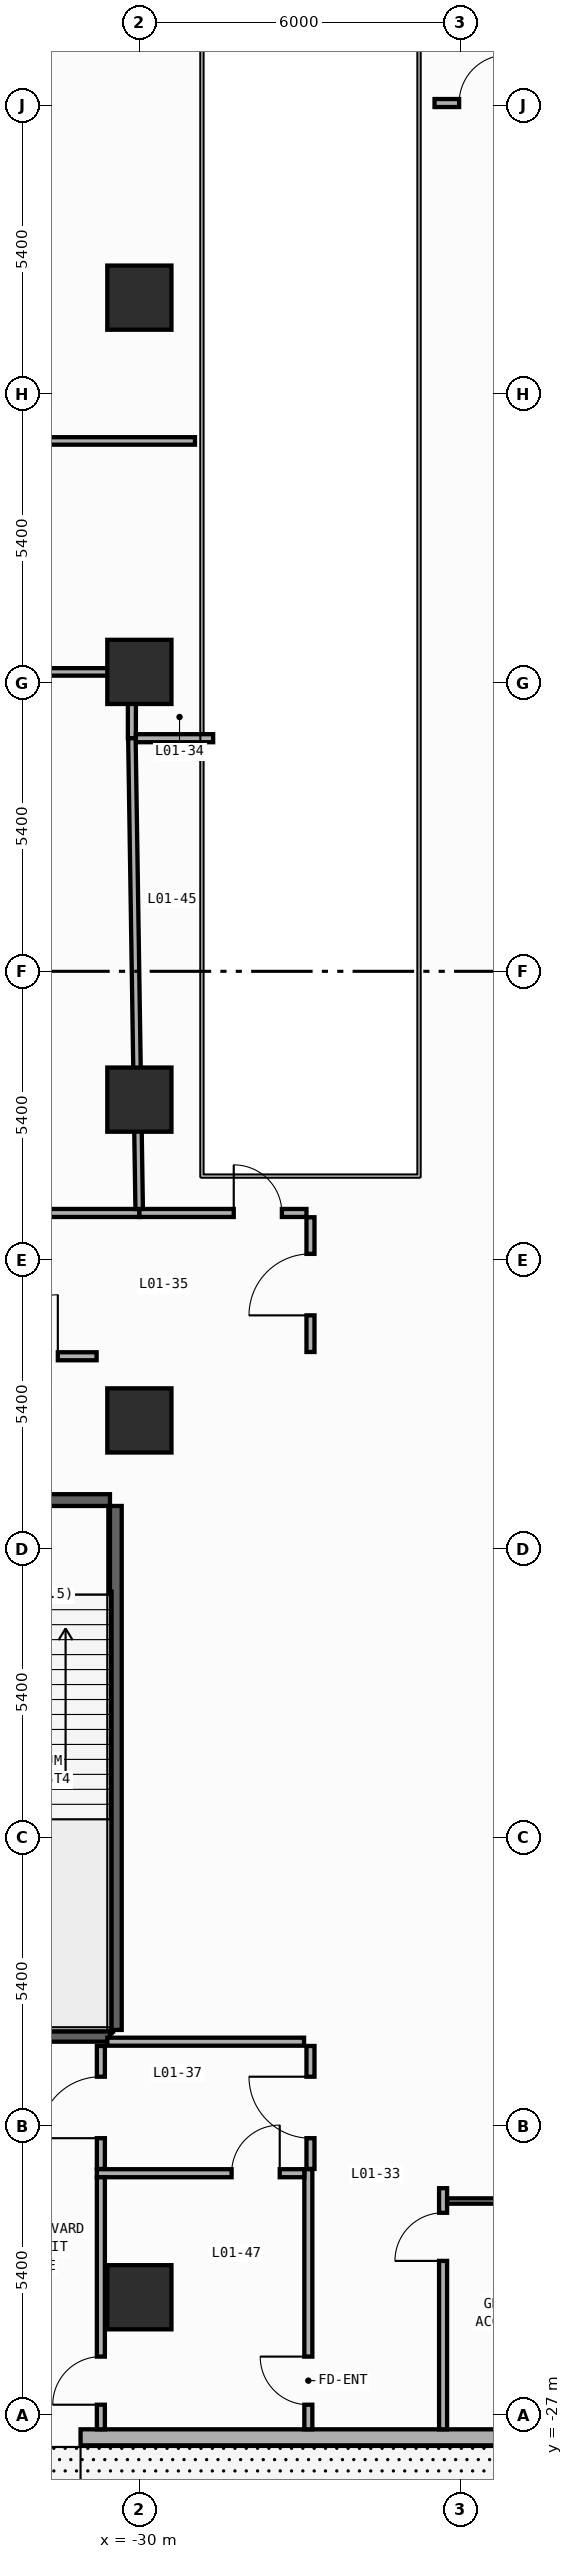
"""IFC4 building model, lengths in metres.
Left out: names, types, materials, properties, quantities, classifications, styles, units other than length and angle.
Written with IfcOpenShell. Run it as: python <this file> out.ifc"""

import sys

from ifc_helpers import new_model, si_unit, direction, frame, frame_2d, origin, origin_2d, place, context, subcontext, project, spatial, rectangle, extrude, element, fill, save


model = new_model("IFC4")
c1 = context("Model", 3, precision=1e-05, world=origin(), true_north=direction((0.0, 1.0)))
c2 = subcontext(c1, "Body", "Model", "MODEL_VIEW")
j1 = project(units=[si_unit("LENGTHUNIT", "METRE"), si_unit("PLANEANGLEUNIT", "RADIAN")], contexts=[c1])
p1 = place(None, origin())
s1 = spatial("IfcSite", under=j1, at=p1, CompositionType="ELEMENT")
p2 = place(p1, origin())
s2 = spatial("IfcBuilding", under=s1, at=p2, CompositionType="ELEMENT")
p3 = place(p2, origin())
s3 = spatial("IfcBuildingStorey", under=s2, at=p3, CompositionType="ELEMENT", Elevation=0.0)
p4 = place(p3, frame((-34.02, -9.89, 0.0), z_axis=(0.0, 0.0, 1.0), x_axis=(1.0, 0.0, 0.0)))
e1 = element("IfcWall", 1, at=p4, inside=s3, PredefinedType="SHEAR", context=c2, shape_type="SweptSolid", body=[
    extrude(rectangle(XDim=3.47, YDim=0.22, at=frame_2d((1.735, 0.0))), origin(), (0.0, 0.0, 1.0), 5.7),
])
p5 = place(p4, frame((1.18, 0.0, 0.0)))
e2 = element("IfcOpeningElement", 2, at=p5, cuts=e1, PredefinedType="OPENING", context=c2, shape_type="SweptSolid", body=[
    extrude(rectangle(XDim=1.1, YDim=2.2, at=frame_2d((0.55, 1.1))), frame((0.0, 0.12, 0.0), z_axis=(0.0, -1.0, 0.0), x_axis=(1.0, 0.0, 0.0)), (0.0, 0.0, 1.0), 0.24),
])
p6 = place(p3, frame((-34.02, -19.91, 0.0), z_axis=(0.0, 0.0, 1.0), x_axis=(1.0, 0.0, 0.0)))
e3 = element("IfcWall", 3, at=p6, inside=s3, PredefinedType="SHEAR", context=c2, shape_type="SweptSolid", body=[
    extrude(rectangle(XDim=3.47, YDim=0.22, at=frame_2d((1.735, 0.0))), origin(), (0.0, 0.0, 1.0), 5.7),
])
p7 = place(p3, frame((-30.44, -19.8, 0.0), z_axis=(0.0, 0.0, 1.0), x_axis=(0.0, 1.0, 0.0)))
e4 = element("IfcWall", 4, at=p7, inside=s3, PredefinedType="SHEAR", context=c2, shape_type="SweptSolid", body=[
    extrude(rectangle(XDim=9.8, YDim=0.22, at=frame_2d((4.9, 0.0))), origin(), (0.0, 0.0, 1.0), 5.7),
])
for number, where, z_axis, x_axis in (
    (5, (-30.0, -24.8, 0.0), (0.0, 0.0, 1.0), (1.0, 0.0, 0.0)),
    (6, (-30.0, -8.4, 0.0), (0.0, 0.0, 1.0), (1.0, 0.0, 0.0)),
    (7, (-30.0, -2.4, 0.0), (0.0, 0.0, 1.0), (1.0, 0.0, 0.0)),
    (8, (-30.0, 5.6, 0.0), (0.0, 0.0, 1.0), (1.0, 0.0, 0.0)),
    (9, (-30.0, 12.6, 0.0), (0.0, 0.0, 1.0), (1.0, 0.0, 0.0)),
):
    element("IfcColumn", number, at=place(p3, frame(where, z_axis=z_axis, x_axis=x_axis)), inside=s3, PredefinedType="COLUMN", context=c2, shape_type="SweptSolid", body=[
        extrude(rectangle(XDim=1.2, YDim=1.2, at=origin_2d()), origin(), (0.0, 0.0, 1.0), 6.0),
    ])
p8 = place(p3, frame((-8.2, -27.42, 0.0), z_axis=(0.0, 0.0, 1.0), x_axis=(-1.0, 0.0, 0.0)))
e10 = element("IfcWall", 10, at=p8, inside=s3, PredefinedType="STANDARD", context=c2, shape_type="SweptSolid", body=[
    extrude(rectangle(XDim=26.4, YDim=0.3, at=frame_2d((13.2, 0.0))), origin(), (0.0, 0.0, 1.0), 5.7),
])
p9 = place(p8, frame((22.9, 0.0, 0.0)))
e11 = element("IfcOpeningElement", 11, at=p9, cuts=e10, PredefinedType="OPENING", context=c2, shape_type="SweptSolid", body=[
    extrude(rectangle(XDim=2.0, YDim=2.4, at=frame_2d((1.0, 1.2))), frame((0.0, 0.16, 0.0), z_axis=(0.0, -1.0, 0.0), x_axis=(1.0, 0.0, 0.0)), (0.0, 0.0, 1.0), 0.32),
])
p10 = place(p8, frame((4.5, 0.0, 0.85)))
e12 = element("IfcOpeningElement", 12, at=p10, cuts=e10, PredefinedType="OPENING", context=c2, shape_type="SweptSolid", body=[
    extrude(rectangle(XDim=2.4, YDim=2.5, at=frame_2d((1.2, 1.25))), frame((0.0, 0.16, 0.0), z_axis=(0.0, -1.0, 0.0), x_axis=(1.0, 0.0, 0.0)), (0.0, 0.0, 1.0), 0.32),
])
p11 = place(p8, frame((11.5, 0.0, 0.85)))
e13 = element("IfcOpeningElement", 13, at=p11, cuts=e10, PredefinedType="OPENING", context=c2, shape_type="SweptSolid", body=[
    extrude(rectangle(XDim=2.1, YDim=2.0, at=frame_2d((1.05, 1.0))), frame((0.0, 0.16, 0.0), z_axis=(0.0, -1.0, 0.0), x_axis=(1.0, 0.0, 0.0)), (0.0, 0.0, 1.0), 0.32),
])
p12 = place(p3, frame((-33.4, -7.2, 0.0), z_axis=(0.0, 0.0, 1.0), x_axis=(1.0, 0.0, 0.0)))
e14 = element("IfcWall", 14, at=p12, inside=s3, PredefinedType="PARTITIONING", context=c2, shape_type="SweptSolid", body=[
    extrude(rectangle(XDim=2.6, YDim=0.15, at=frame_2d((1.3, 0.0))), origin(), (0.0, 0.0, 1.0), 5.7),
])
p13 = place(p12, frame((0.725, 0.0, 0.0)))
e15 = element("IfcOpeningElement", 15, at=p13, cuts=e14, PredefinedType="OPENING", context=c2, shape_type="SweptSolid", body=[
    extrude(rectangle(XDim=1.15, YDim=2.2, at=frame_2d((0.575, 1.1))), frame((0.0, 0.085, 0.0), z_axis=(0.0, -1.0, 0.0), x_axis=(1.0, 0.0, 0.0)), (0.0, 0.0, 1.0), 0.17),
])
p14 = place(p3, frame((-26.8, -7.12, 0.0), z_axis=(0.0, 0.0, 1.0), x_axis=(0.0, 1.0, 0.0)))
e16 = element("IfcWall", 16, at=p14, inside=s3, PredefinedType="PARTITIONING", context=c2, shape_type="SweptSolid", body=[
    extrude(rectangle(XDim=2.52, YDim=0.15, at=frame_2d((1.26, 0.0))), origin(), (0.0, 0.0, 1.0), 5.7),
])
p15 = place(p14, frame((0.685, 0.0, 0.0)))
e17 = element("IfcOpeningElement", 17, at=p15, cuts=e16, PredefinedType="OPENING", context=c2, shape_type="SweptSolid", body=[
    extrude(rectangle(XDim=1.15, YDim=2.2, at=frame_2d((0.575, 1.1))), frame((0.0, 0.085, 0.0), z_axis=(0.0, -1.0, 0.0), x_axis=(1.0, 0.0, 0.0)), (0.0, 0.0, 1.0), 0.17),
])
p16 = place(p3, frame((-26.8, -22.4, 0.0), z_axis=(0.0, 0.0, 1.0), x_axis=(0.0, 1.0, 0.0)))
e18 = element("IfcWall", 18, at=p16, inside=s3, PredefinedType="PARTITIONING", context=c2, shape_type="SweptSolid", body=[
    extrude(rectangle(XDim=2.3, YDim=0.15, at=frame_2d((1.15, 0.0))), origin(), (0.0, 0.0, 1.0), 5.7),
])
p17 = place(p16, frame((0.575, 0.0, 0.0)))
e19 = element("IfcOpeningElement", 19, at=p17, cuts=e18, PredefinedType="OPENING", context=c2, shape_type="SweptSolid", body=[
    extrude(rectangle(XDim=1.15, YDim=2.2, at=frame_2d((0.575, 1.1))), frame((0.0, 0.085, 0.0), z_axis=(0.0, -1.0, 0.0), x_axis=(1.0, 0.0, 0.0)), (0.0, 0.0, 1.0), 0.17),
])
p18 = place(p3, frame((-30.72, -22.4, 0.0), z_axis=(0.0, 0.0, 1.0), x_axis=(0.0, 1.0, 0.0)))
e20 = element("IfcWall", 20, at=p18, inside=s3, PredefinedType="PARTITIONING", context=c2, shape_type="SweptSolid", body=[
    extrude(rectangle(XDim=2.3, YDim=0.15, at=frame_2d((1.15, 0.0))), origin(), (0.0, 0.0, 1.0), 5.7),
])
p19 = place(p18, frame((0.575, 0.0, 0.0)))
e21 = element("IfcOpeningElement", 21, at=p19, cuts=e20, PredefinedType="OPENING", context=c2, shape_type="SweptSolid", body=[
    extrude(rectangle(XDim=1.15, YDim=2.2, at=frame_2d((0.575, 1.1))), frame((0.0, 0.085, 0.0), z_axis=(0.0, -1.0, 0.0), x_axis=(1.0, 0.0, 0.0)), (0.0, 0.0, 1.0), 0.17),
])
p20 = place(p3, frame((-30.6, -20.02, 0.0), z_axis=(0.0, 0.0, 1.0), x_axis=(1.0, 0.0, 0.0)))
e22 = element("IfcWall", 22, at=p20, inside=s3, PredefinedType="PARTITIONING", context=c2, shape_type="SweptSolid", body=[
    extrude(rectangle(XDim=3.68, YDim=0.15, at=frame_2d((1.84, 0.0))), origin(), (0.0, 0.0, 1.0), 5.7),
])
p21 = place(p3, frame((-26.84, -27.27, 0.0), z_axis=(0.0, 0.0, 1.0), x_axis=(0.0, 1.0, 0.0)))
e23 = element("IfcWall", 23, at=p21, inside=s3, PredefinedType="PARTITIONING", context=c2, shape_type="SweptSolid", body=[
    extrude(rectangle(XDim=4.865, YDim=0.15, at=frame_2d((2.433, 0.0))), origin(), (0.0, 0.0, 1.0), 5.7),
])
p22 = place(p21, frame((0.46, 0.0, 0.0)))
e24 = element("IfcOpeningElement", 24, at=p22, cuts=e23, PredefinedType="OPENING", context=c2, shape_type="SweptSolid", body=[
    extrude(rectangle(XDim=0.9, YDim=2.15, at=frame_2d((0.45, 1.075))), frame((0.0, 0.085, 0.0), z_axis=(0.0, -1.0, 0.0), x_axis=(1.0, 0.0, 0.0)), (0.0, 0.0, 1.0), 0.17),
])
p23 = place(p3, frame((-24.32, -27.27, 0.0), z_axis=(0.0, 0.0, 1.0), x_axis=(0.0, 1.0, 0.0)))
e25 = element("IfcWall", 25, at=p23, inside=s3, PredefinedType="PARTITIONING", context=c2, shape_type="SweptSolid", body=[
    extrude(rectangle(XDim=4.51, YDim=0.15, at=frame_2d((2.255, 0.0))), origin(), (0.0, 0.0, 1.0), 5.7),
])
p24 = place(p23, frame((3.15, 0.0, 0.0)))
e26 = element("IfcOpeningElement", 26, at=p24, cuts=e25, PredefinedType="OPENING", context=c2, shape_type="SweptSolid", body=[
    extrude(rectangle(XDim=0.9, YDim=2.15, at=frame_2d((0.45, 1.075))), frame((0.0, 0.085, 0.0), z_axis=(0.0, -1.0, 0.0), x_axis=(1.0, 0.0, 0.0)), (0.0, 0.0, 1.0), 0.17),
])
p25 = place(p3, frame((-30.14, 4.36, 0.0), z_axis=(0.0, 0.0, 1.0), x_axis=(0.0, 1.0, 0.0)))
e27 = element("IfcWall", 27, at=p25, inside=s3, PredefinedType="PARTITIONING", context=c2, shape_type="SweptSolid", body=[
    extrude(rectangle(XDim=1.31, YDim=0.15, at=frame_2d((0.655, 0.0))), origin(), (0.0, 0.0, 1.0), 4.8),
])
p26 = place(p3, frame((-30.065, 4.36, 0.0), z_axis=(0.0, 0.0, 1.0), x_axis=(1.0, 0.0, 0.0)))
e28 = element("IfcWall", 28, at=p26, inside=s3, PredefinedType="PARTITIONING", context=c2, shape_type="SweptSolid", body=[
    extrude(rectangle(XDim=1.445, YDim=0.15, at=frame_2d((0.722, 0.0))), origin(), (0.0, 0.0, 1.0), 5.7),
])
p27 = place(p3, frame((-33.64, -4.52, 0.0), z_axis=(0.0, 0.0, 1.0), x_axis=(1.0, 0.0, 0.0)))
e29 = element("IfcWall", 29, at=p27, inside=s3, PredefinedType="PARTITIONING", context=c2, shape_type="SweptSolid", body=[
    extrude(rectangle(XDim=3.64, YDim=0.15, at=frame_2d((1.82, 0.0))), origin(), (0.0, 0.0, 1.0), 5.7),
])
p28 = place(p27, frame((1.067, 0.0, 0.0)))
e30 = element("IfcOpeningElement", 30, at=p28, cuts=e29, PredefinedType="OPENING", context=c2, shape_type="SweptSolid", body=[
    extrude(rectangle(XDim=0.9, YDim=2.15, at=frame_2d((0.45, 1.075))), frame((0.0, 0.085, 0.0), z_axis=(0.0, -1.0, 0.0), x_axis=(1.0, 0.0, 0.0)), (0.0, 0.0, 1.0), 0.17),
])
p29 = place(p3, frame((-30.0, -4.52, 0.0), z_axis=(0.0, 0.0, 1.0), x_axis=(1.0, 0.0, 0.0)))
e31 = element("IfcWall", 31, at=p29, inside=s3, PredefinedType="PARTITIONING", context=c2, shape_type="SweptSolid", body=[
    extrude(rectangle(XDim=3.125, YDim=0.15, at=frame_2d((1.562, 0.0))), origin(), (0.0, 0.0, 1.0), 5.7),
])
p30 = place(p29, frame((1.765, 0.0, 0.0)))
e32 = element("IfcOpeningElement", 32, at=p30, cuts=e31, PredefinedType="OPENING", context=c2, shape_type="SweptSolid", body=[
    extrude(rectangle(XDim=0.9, YDim=2.15, at=frame_2d((0.45, 1.075))), frame((0.0, 0.085, 0.0), z_axis=(0.0, -1.0, 0.0), x_axis=(1.0, 0.0, 0.0)), (0.0, 0.0, 1.0), 0.17),
])
p31 = place(p3, frame((-30.795, -22.48, 0.0), z_axis=(0.0, 0.0, 1.0), x_axis=(1.0, 0.0, 0.0)))
e33 = element("IfcWall", 33, at=p31, inside=s3, PredefinedType="PARTITIONING", context=c2, shape_type="SweptSolid", body=[
    extrude(rectangle(XDim=3.88, YDim=0.15, at=frame_2d((1.94, 0.0))), origin(), (0.0, 0.0, 1.0), 5.7),
])
p32 = place(p31, frame((2.52, 0.0, 0.0)))
e34 = element("IfcOpeningElement", 34, at=p32, cuts=e33, PredefinedType="OPENING", context=c2, shape_type="SweptSolid", body=[
    extrude(rectangle(XDim=0.9, YDim=2.15, at=frame_2d((0.45, 1.075))), frame((0.0, 0.085, 0.0), z_axis=(0.0, -1.0, 0.0), x_axis=(1.0, 0.0, 0.0)), (0.0, 0.0, 1.0), 0.17),
])
p33 = place(p3, frame((-30.72, -27.27, 0.0), z_axis=(0.0, 0.0, 1.0), x_axis=(0.0, 1.0, 0.0)))
e35 = element("IfcWall", 35, at=p33, inside=s3, PredefinedType="PARTITIONING", context=c2, shape_type="SweptSolid", body=[
    extrude(rectangle(XDim=4.715, YDim=0.15, at=frame_2d((2.357, 0.0))), origin(), (0.0, 0.0, 1.0), 5.7),
])
p34 = place(p33, frame((0.46, 0.0, 0.0)))
e36 = element("IfcOpeningElement", 36, at=p34, cuts=e35, PredefinedType="OPENING", context=c2, shape_type="SweptSolid", body=[
    extrude(rectangle(XDim=0.9, YDim=2.15, at=frame_2d((0.45, 1.075))), frame((0.0, 0.085, 0.0), z_axis=(0.0, -1.0, 0.0), x_axis=(1.0, 0.0, 0.0)), (0.0, 0.0, 1.0), 0.17),
])
p35 = place(p3, frame((-24.48, 16.24, 0.0), z_axis=(0.0, 0.0, 1.0), x_axis=(1.0, 0.0, 0.0)))
e37 = element("IfcWall", 37, at=p35, inside=s3, PredefinedType="PARTITIONING", context=c2, shape_type="SweptSolid", body=[
    extrude(rectangle(XDim=10.08, YDim=0.15, at=frame_2d((5.04, 0.0))), origin(), (0.0, 0.0, 1.0), 5.7),
])
p36 = place(p35, frame((0.46, 0.0, 0.0)))
e38 = element("IfcOpeningElement", 38, at=p36, cuts=e37, PredefinedType="OPENING", context=c2, shape_type="SweptSolid", body=[
    extrude(rectangle(XDim=0.9, YDim=2.15, at=frame_2d((0.45, 1.075))), frame((0.0, 0.085, 0.0), z_axis=(0.0, -1.0, 0.0), x_axis=(1.0, 0.0, 0.0)), (0.0, 0.0, 1.0), 0.17),
])
p37 = place(p3, frame((-36.27, 9.92, 0.0), z_axis=(0.0, 0.0, 1.0), x_axis=(1.0, 0.0, 0.0)))
e39 = element("IfcWall", 39, at=p37, inside=s3, PredefinedType="PARTITIONING", context=c2, shape_type="SweptSolid", body=[
    extrude(rectangle(XDim=7.31, YDim=0.14, at=frame_2d((3.655, 0.0))), origin(), (0.0, 0.0, 1.0), 5.7),
])
p38 = place(p37, frame((3.743, 0.0, 0.0)))
e40 = element("IfcOpeningElement", 40, at=p38, cuts=e39, PredefinedType="OPENING", context=c2, shape_type="SweptSolid", body=[
    extrude(rectangle(XDim=0.85, YDim=2.1, at=frame_2d((0.425, 1.05))), frame((0.0, 0.08, 0.0), z_axis=(0.0, -1.0, 0.0), x_axis=(1.0, 0.0, 0.0)), (0.0, 0.0, 1.0), 0.16),
])
p39 = place(p3, frame((-30.004, -4.445, 0.0), z_axis=(0.0, 0.0, 1.0), x_axis=(-0.015469783933, 0.999880335733, 0.0)))
e41 = element("IfcWall", 41, at=p39, inside=s3, PredefinedType="PARTITIONING", context=c2, shape_type="SweptSolid", body=[
    extrude(rectangle(XDim=8.806, YDim=0.14, at=frame_2d((4.403, 0.0))), origin(), (0.0, 0.0, 1.0), 4.8),
])
p40 = place(p3, frame((-36.27, 5.6, 0.0), z_axis=(0.0, 0.0, 1.0), x_axis=(1.0, 0.0, 0.0)))
e42 = element("IfcWall", 42, at=p40, inside=s3, PredefinedType="PARTITIONING", context=c2, shape_type="SweptSolid", body=[
    extrude(rectangle(XDim=6.055, YDim=0.14, at=frame_2d((3.027, 0.0))), origin(), (0.0, 0.0, 1.0), 4.8),
])
p41 = place(p40, frame((3.725, 0.0, 0.0)))
e43 = element("IfcOpeningElement", 43, at=p41, cuts=e42, PredefinedType="OPENING", context=c2, shape_type="SweptSolid", body=[
    extrude(rectangle(XDim=0.85, YDim=2.1, at=frame_2d((0.425, 1.05))), frame((0.0, 0.08, 0.0), z_axis=(0.0, -1.0, 0.0), x_axis=(1.0, 0.0, 0.0)), (0.0, 0.0, 1.0), 0.16),
])
p42 = place(p3, frame((-24.245, -23.0, 0.0), z_axis=(0.0, 0.0, 1.0), x_axis=(1.0, 0.0, 0.0)))
e44 = element("IfcWall", 44, at=p42, inside=s3, PredefinedType="PARTITIONING", context=c2, shape_type="SweptSolid", body=[
    extrude(rectangle(XDim=3.045, YDim=0.1, at=frame_2d((1.522, 0.0))), origin(), (0.0, 0.0, 1.0), 5.7),
])
p43 = place(p9, origin())
e45 = element("IfcDoor", 45, at=p43, inside=s3, OperationType="DOUBLE_DOOR_SINGLE_SWING", PredefinedType="DOOR", context=c2, shape_type="SweptSolid", body=[
    extrude(rectangle(XDim=2.0, YDim=2.4, at=frame_2d((1.0, 1.2))), frame((0.0, 0.025, 0.0), z_axis=(0.0, -1.0, 0.0), x_axis=(1.0, 0.0, 0.0)), (0.0, 0.0, 1.0), 0.05),
])
fill(e11, e45)
p44 = place(p13, origin())
e46 = element("IfcDoor", 46, at=p44, inside=s3, OperationType="SINGLE_SWING_RIGHT", PredefinedType="DOOR", context=c2, shape_type="SweptSolid", body=[
    extrude(rectangle(XDim=1.15, YDim=2.2, at=frame_2d((0.575, 1.1))), frame((0.0, 0.025, 0.0), z_axis=(0.0, -1.0, 0.0), x_axis=(1.0, 0.0, 0.0)), (0.0, 0.0, 1.0), 0.05),
])
fill(e15, e46)
p45 = place(p15, origin())
e47 = element("IfcDoor", 47, at=p45, inside=s3, OperationType="SINGLE_SWING_LEFT", PredefinedType="DOOR", context=c2, shape_type="SweptSolid", body=[
    extrude(rectangle(XDim=1.15, YDim=2.2, at=frame_2d((0.575, 1.1))), frame((0.0, 0.025, 0.0), z_axis=(0.0, -1.0, 0.0), x_axis=(1.0, 0.0, 0.0)), (0.0, 0.0, 1.0), 0.05),
])
fill(e17, e47)
p46 = place(p17, origin())
e48 = element("IfcDoor", 48, at=p46, inside=s3, OperationType="SINGLE_SWING_RIGHT", PredefinedType="DOOR", context=c2, shape_type="SweptSolid", body=[
    extrude(rectangle(XDim=1.15, YDim=2.2, at=frame_2d((0.575, 1.1))), frame((0.0, 0.025, 0.0), z_axis=(0.0, -1.0, 0.0), x_axis=(1.0, 0.0, 0.0)), (0.0, 0.0, 1.0), 0.05),
])
fill(e19, e48)
p47 = place(p19, origin())
e49 = element("IfcDoor", 49, at=p47, inside=s3, OperationType="SINGLE_SWING_LEFT", PredefinedType="DOOR", context=c2, shape_type="SweptSolid", body=[
    extrude(rectangle(XDim=1.15, YDim=2.2, at=frame_2d((0.575, 1.1))), frame((0.0, 0.025, 0.0), z_axis=(0.0, -1.0, 0.0), x_axis=(1.0, 0.0, 0.0)), (0.0, 0.0, 1.0), 0.05),
])
fill(e21, e49)
p48 = place(p22, origin())
e50 = element("IfcDoor", 50, at=p48, inside=s3, OperationType="SINGLE_SWING_RIGHT", PredefinedType="DOOR", context=c2, shape_type="SweptSolid", body=[
    extrude(rectangle(XDim=0.9, YDim=2.15, at=frame_2d((0.45, 1.075))), frame((0.0, 0.025, 0.0), z_axis=(0.0, -1.0, 0.0), x_axis=(1.0, 0.0, 0.0)), (0.0, 0.0, 1.0), 0.05),
])
fill(e24, e50)
p49 = place(p24, origin())
e51 = element("IfcDoor", 51, at=p49, inside=s3, OperationType="SINGLE_SWING_LEFT", PredefinedType="DOOR", context=c2, shape_type="SweptSolid", body=[
    extrude(rectangle(XDim=0.9, YDim=2.15, at=frame_2d((0.45, 1.075))), frame((0.0, 0.025, 0.0), z_axis=(0.0, -1.0, 0.0), x_axis=(1.0, 0.0, 0.0)), (0.0, 0.0, 1.0), 0.05),
])
fill(e26, e51)
p50 = place(p30, origin())
e52 = element("IfcDoor", 52, at=p50, inside=s3, OperationType="SINGLE_SWING_LEFT", PredefinedType="DOOR", context=c2, shape_type="SweptSolid", body=[
    extrude(rectangle(XDim=0.9, YDim=2.15, at=frame_2d((0.45, 1.075))), frame((0.0, 0.025, 0.0), z_axis=(0.0, -1.0, 0.0), x_axis=(1.0, 0.0, 0.0)), (0.0, 0.0, 1.0), 0.05),
])
fill(e32, e52)
p51 = place(p32, origin())
e53 = element("IfcDoor", 53, at=p51, inside=s3, OperationType="SINGLE_SWING_RIGHT", PredefinedType="DOOR", context=c2, shape_type="SweptSolid", body=[
    extrude(rectangle(XDim=0.9, YDim=2.15, at=frame_2d((0.45, 1.075))), frame((0.0, 0.025, 0.0), z_axis=(0.0, -1.0, 0.0), x_axis=(1.0, 0.0, 0.0)), (0.0, 0.0, 1.0), 0.05),
])
fill(e34, e53)
p52 = place(p34, origin())
e54 = element("IfcDoor", 54, at=p52, inside=s3, OperationType="SINGLE_SWING_LEFT", PredefinedType="DOOR", context=c2, shape_type="SweptSolid", body=[
    extrude(rectangle(XDim=0.9, YDim=2.15, at=frame_2d((0.45, 1.075))), frame((0.0, 0.025, 0.0), z_axis=(0.0, -1.0, 0.0), x_axis=(1.0, 0.0, 0.0)), (0.0, 0.0, 1.0), 0.05),
])
fill(e36, e54)
p53 = place(p36, origin())
e55 = element("IfcDoor", 55, at=p53, inside=s3, OperationType="SINGLE_SWING_RIGHT", PredefinedType="DOOR", context=c2, shape_type="SweptSolid", body=[
    extrude(rectangle(XDim=0.9, YDim=2.15, at=frame_2d((0.45, 1.075))), frame((0.0, 0.025, 0.0), z_axis=(0.0, -1.0, 0.0), x_axis=(1.0, 0.0, 0.0)), (0.0, 0.0, 1.0), 0.05),
])
fill(e38, e55)
save(model, sys.argv[1])
